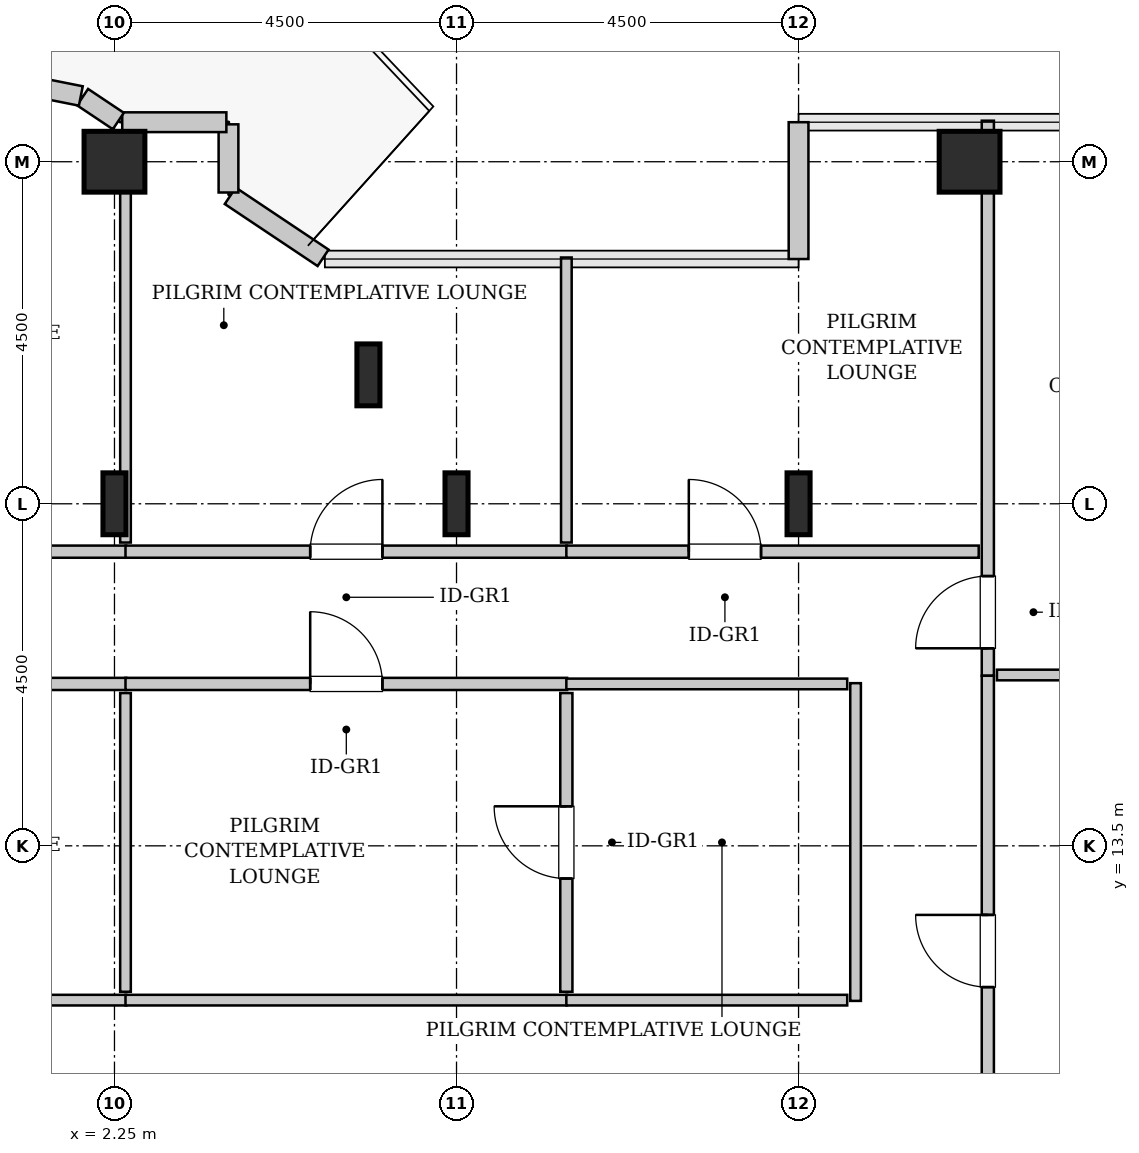
"""IFC4 building model, lengths in metres.
Left out: names, types, materials, properties, quantities, classifications, styles, units other than length and angle.
Written with IfcOpenShell. Run it as: python <this file> out.ifc"""

import sys

from ifc_helpers import new_model, si_unit, direction, frame, frame_2d, origin, origin_2d, place, context, subcontext, project, spatial, rectangle, hollow_rectangle, i_section, extrude, source, transform, mapped, element, fill, save


model = new_model("IFC4")
c1 = context("Model", 3, precision=1e-05, world=origin(), true_north=direction((0.0, 1.0)))
c2 = subcontext(c1, "Body", "Model", "MODEL_VIEW")
j1 = project(units=[si_unit("LENGTHUNIT", "METRE"), si_unit("PLANEANGLEUNIT", "RADIAN")], contexts=[c1])
p1 = place(None, origin())
s1 = spatial("IfcSite", under=j1, at=p1, CompositionType="ELEMENT")
p2 = place(p1, origin())
s2 = spatial("IfcBuilding", under=s1, at=p2, CompositionType="ELEMENT")
p3 = place(p2, frame((0.0, 0.0, 148.8)))
s3 = spatial("IfcBuildingStorey", under=s2, at=p3, CompositionType="ELEMENT", Elevation=148.8)
m1 = source(origin(), c2, "Body", "SweptSolid", [
    extrude(i_section(OverallWidth=0.303, OverallDepth=0.814, WebThickness=0.021, FlangeThickness=0.04, FilletRadius=0.03, at=origin_2d()), origin(), (0.0, 0.0, 1.0), 3.8),
])
p4 = place(p3, frame((2.25, 18.0, 0.0), z_axis=(0.0, 0.0, 1.0), x_axis=(1.0, 0.0, 0.0)))
e1 = element("IfcColumn", 1, at=p4, inside=s3, PredefinedType="COLUMN", context=c2, shape_type="MappedRepresentation", body=[
    mapped(m1, transform((0.0, 0.0, 0.0), x_axis=(1.0, 0.0, 0.0), y_axis=(0.0, 1.0, 0.0), z_axis=(0.0, 0.0, 1.0), scale=1.0)),
])
m2 = source(origin(), c2, "Body", "SweptSolid", [
    extrude(hollow_rectangle(XDim=0.8, YDim=0.8, WallThickness=0.04, InnerFilletRadius=0.04, OuterFilletRadius=0.08, at=origin_2d()), origin(), (0.0, 0.0, 1.0), 3.8),
])
p5 = place(p3, frame((2.25, 22.5, 0.0), z_axis=(0.0, 0.0, 1.0), x_axis=(1.0, 0.0, 0.0)))
e2 = element("IfcColumn", 2, at=p5, inside=s3, PredefinedType="COLUMN", context=c2, shape_type="MappedRepresentation", body=[
    mapped(m2, transform((0.0, 0.0, 0.0), x_axis=(1.0, 0.0, 0.0), y_axis=(0.0, 1.0, 0.0), z_axis=(0.0, 0.0, 1.0), scale=1.0)),
])
for number, where, z_axis, x_axis in (
    (3, (5.591, 19.696, 0.0), (0.0, 0.0, 1.0), (1.0, 0.0, 0.0)),
    (4, (6.75, 18.0, 0.0), (0.0, 0.0, 1.0), (1.0, 0.0, 0.0)),
    (5, (11.25, 18.0, 0.0), (0.0, 0.0, 1.0), (1.0, 0.0, 0.0)),
):
    element("IfcColumn", number, at=place(p3, frame(where, z_axis=z_axis, x_axis=x_axis)), inside=s3, PredefinedType="COLUMN", context=c2, shape_type="MappedRepresentation", body=[
        mapped(m1, transform((0.0, 0.0, 0.0), x_axis=(1.0, 0.0, 0.0), y_axis=(0.0, 1.0, 0.0), z_axis=(0.0, 0.0, 1.0), scale=1.0)),
    ])
p6 = place(p3, frame((13.5, 22.5, 0.0), z_axis=(0.0, 0.0, 1.0), x_axis=(1.0, 0.0, 0.0)))
e6 = element("IfcColumn", 6, at=p6, inside=s3, PredefinedType="COLUMN", context=c2, shape_type="MappedRepresentation", body=[
    mapped(m2, transform((0.0, 0.0, 0.0), x_axis=(1.0, 0.0, 0.0), y_axis=(0.0, 1.0, 0.0), z_axis=(0.0, 0.0, 1.0), scale=1.0)),
])
m3 = source(origin(), c2, "Body", "SweptSolid", [
    extrude(rectangle(XDim=1.8, YDim=0.26, at=frame_2d((0.9, 0.0))), origin(), (0.0, 0.0, 1.0), 3.55),
])
p7 = place(p3, frame((11.25, 23.02, 0.0), z_axis=(0.0, 0.0, 1.0), x_axis=(0.0, -1.0, 0.0)))
e7 = element("IfcWall", 7, at=p7, inside=s3, PredefinedType="SOLIDWALL", context=c2, shape_type="MappedRepresentation", body=[
    mapped(m3, transform((0.0, 0.0, 0.0), x_axis=(1.0, 0.0, 0.0), y_axis=(0.0, 1.0, 0.0), z_axis=(0.0, 0.0, 1.0), scale=1.0)),
])
m4 = source(origin(), c2, "Body", "SweptSolid", [
    extrude(rectangle(XDim=1.469, YDim=0.26, at=frame_2d((0.734, 0.0))), origin(), (0.0, 0.0, 1.0), 3.55),
])
p8 = place(p3, frame((4.995, 21.236, 0.0), z_axis=(0.0, 0.0, 1.0), x_axis=(-0.831461760506, 0.555581983884, 0.0)))
e8 = element("IfcWall", 8, at=p8, inside=s3, PredefinedType="SOLIDWALL", context=c2, shape_type="MappedRepresentation", body=[
    mapped(m4, transform((0.0, 0.0, 0.0), x_axis=(1.0, 0.0, 0.0), y_axis=(0.0, 1.0, 0.0), z_axis=(0.0, 0.0, 1.0), scale=1.0)),
])
m5 = source(origin(), c2, "Body", "SweptSolid", [
    extrude(rectangle(XDim=0.897, YDim=0.26, at=frame_2d((0.448, 0.0))), origin(), (0.0, 0.0, 1.0), 3.55),
])
p9 = place(p3, frame((3.75, 22.095, 0.0), z_axis=(0.0, 0.0, 1.0), x_axis=(0.0, 1.0, 0.0)))
e9 = element("IfcWall", 9, at=p9, inside=s3, PredefinedType="SOLIDWALL", context=c2, shape_type="MappedRepresentation", body=[
    mapped(m5, transform((0.0, 0.0, 0.0), x_axis=(1.0, 0.0, 0.0), y_axis=(0.0, 1.0, 0.0), z_axis=(0.0, 0.0, 1.0), scale=1.0)),
])
m6 = source(origin(), c2, "Body", "SweptSolid", [
    extrude(rectangle(XDim=1.37, YDim=0.26, at=frame_2d((0.685, 0.0))), origin(), (0.0, 0.0, 1.0), 3.55),
])
p10 = place(p3, frame((3.722, 23.02, 0.0), z_axis=(0.0, 0.0, 1.0), x_axis=(-1.0, 0.0, 0.0)))
e10 = element("IfcWall", 10, at=p10, inside=s3, PredefinedType="SOLIDWALL", context=c2, shape_type="MappedRepresentation", body=[
    mapped(m6, transform((0.0, 0.0, 0.0), x_axis=(1.0, 0.0, 0.0), y_axis=(0.0, 1.0, 0.0), z_axis=(0.0, 0.0, 1.0), scale=1.0)),
])
m7 = source(origin(), c2, "Body", "SweptSolid", [
    extrude(rectangle(XDim=0.565, YDim=0.26, at=frame_2d((0.283, 0.0))), origin(), (0.0, 0.0, 1.0), 3.55),
])
p11 = place(p3, frame((2.301, 23.036, 0.0), z_axis=(0.0, 0.0, 1.0), x_axis=(-0.831651492666, 0.555297933317, 0.0)))
e11 = element("IfcWall", 11, at=p11, inside=s3, PredefinedType="SOLIDWALL", context=c2, shape_type="MappedRepresentation", body=[
    mapped(m7, transform((0.0, 0.0, 0.0), x_axis=(1.0, 0.0, 0.0), y_axis=(0.0, 1.0, 0.0), z_axis=(0.0, 0.0, 1.0), scale=1.0)),
])
m8 = source(origin(), c2, "Body", "SweptSolid", [
    extrude(rectangle(XDim=4.137, YDim=0.26, at=frame_2d((2.068, 0.0))), origin(), (0.0, 0.0, 1.0), 3.55),
])
p12 = place(p3, frame((1.807, 23.365, 0.0), z_axis=(0.0, 0.0, 1.0), x_axis=(-0.980782170794, 0.195105954428, 0.0)))
e12 = element("IfcWall", 12, at=p12, inside=s3, PredefinedType="SOLIDWALL", context=c2, shape_type="MappedRepresentation", body=[
    mapped(m8, transform((0.0, 0.0, 0.0), x_axis=(1.0, 0.0, 0.0), y_axis=(0.0, 1.0, 0.0), z_axis=(0.0, 0.0, 1.0), scale=1.0)),
])
p13 = place(p12, frame((0.488, 0.0, 0.0)))
e13 = element("IfcOpeningElement", 13, at=p13, cuts=e12, PredefinedType="OPENING", context=c2, shape_type="SweptSolid", body=[
    extrude(rectangle(XDim=1.1, YDim=2.2, at=frame_2d((0.55, 1.1))), frame((0.0, 0.14, 0.0), z_axis=(0.0, -1.0, 0.0), x_axis=(1.0, 0.0, 0.0)), (0.0, 0.0, 1.0), 0.28),
])
m9 = source(origin(), c2, "Body", "SweptSolid", [
    extrude(rectangle(XDim=7.302, YDim=0.16, at=frame_2d((3.651, 0.0))), origin(), (0.0, 0.0, 1.0), 3.535),
])
p14 = place(p3, frame((13.74, 15.738, 0.0), z_axis=(0.0, 0.0, 1.0), x_axis=(0.0, 1.0, 0.0)))
e14 = element("IfcWall", 14, at=p14, inside=s3, PredefinedType="PARTITIONING", context=c2, shape_type="MappedRepresentation", body=[
    mapped(m9, transform((0.0, 0.0, 0.0), x_axis=(1.0, 0.0, 0.0), y_axis=(0.0, 1.0, 0.0), z_axis=(0.0, 0.0, 1.0), scale=1.0)),
])
p15 = place(p14, frame((0.361, 0.0, 0.0)))
e15 = element("IfcOpeningElement", 15, at=p15, cuts=e14, PredefinedType="OPENING", context=c2, shape_type="SweptSolid", body=[
    extrude(rectangle(XDim=0.95, YDim=2.1, at=frame_2d((0.475, 1.05))), frame((0.0, 0.09, 0.0), z_axis=(0.0, -1.0, 0.0), x_axis=(1.0, 0.0, 0.0)), (0.0, 0.0, 1.0), 0.18),
])
m10 = source(origin(), c2, "Body", "SweptSolid", [
    extrude(rectangle(XDim=11.43, YDim=0.14, at=frame_2d((5.715, 0.0))), origin(), (0.0, 0.0, 1.0), 3.535),
])
p16 = place(p3, frame((13.86, 15.748, 0.0), z_axis=(0.0, 0.0, 1.0), x_axis=(1.0, 0.0, 0.0)))
e16 = element("IfcWall", 16, at=p16, inside=s3, PredefinedType="PARTITIONING", context=c2, shape_type="MappedRepresentation", body=[
    mapped(m10, transform((0.0, 0.0, 0.0), x_axis=(1.0, 0.0, 0.0), y_axis=(0.0, 1.0, 0.0), z_axis=(0.0, 0.0, 1.0), scale=1.0)),
])
m11 = source(origin(), c2, "Body", "SweptSolid", [
    extrude(rectangle(XDim=7.242, YDim=0.16, at=frame_2d((3.621, 0.0))), origin(), (0.0, 0.0, 1.0), 3.535),
])
p17 = place(p3, frame((13.74, 8.495, 0.0), z_axis=(0.0, 0.0, 1.0), x_axis=(0.0, 1.0, 0.0)))
e17 = element("IfcWall", 17, at=p17, inside=s3, PredefinedType="PARTITIONING", context=c2, shape_type="MappedRepresentation", body=[
    mapped(m11, transform((0.0, 0.0, 0.0), x_axis=(1.0, 0.0, 0.0), y_axis=(0.0, 1.0, 0.0), z_axis=(0.0, 0.0, 1.0), scale=1.0)),
])
p18 = place(p17, frame((3.146, 0.0, 0.0)))
e18 = element("IfcOpeningElement", 18, at=p18, cuts=e17, PredefinedType="OPENING", context=c2, shape_type="SweptSolid", body=[
    extrude(rectangle(XDim=0.95, YDim=2.1, at=frame_2d((0.475, 1.05))), frame((0.0, 0.09, 0.0), z_axis=(0.0, -1.0, 0.0), x_axis=(1.0, 0.0, 0.0)), (0.0, 0.0, 1.0), 0.18),
])
m12 = source(origin(), c2, "Body", "SweptSolid", [
    extrude(rectangle(XDim=7.41, YDim=0.16, at=frame_2d((3.705, 0.0))), origin(), (0.0, 0.0, 1.0), 3.535),
])
p19 = place(p3, frame((-5.005, 17.37, 0.0), z_axis=(0.0, 0.0, 1.0), x_axis=(1.0, 0.0, 0.0)))
e19 = element("IfcWall", 19, at=p19, inside=s3, PredefinedType="PARTITIONING", context=c2, shape_type="MappedRepresentation", body=[
    mapped(m12, transform((0.0, 0.0, 0.0), x_axis=(1.0, 0.0, 0.0), y_axis=(0.0, 1.0, 0.0), z_axis=(0.0, 0.0, 1.0), scale=1.0)),
])
p20 = place(p19, frame((3.23, 0.0, 0.0)))
e20 = element("IfcOpeningElement", 20, at=p20, cuts=e19, PredefinedType="OPENING", context=c2, shape_type="SweptSolid", body=[
    extrude(rectangle(XDim=0.95, YDim=2.1, at=frame_2d((0.475, 1.05))), frame((0.0, 0.09, 0.0), z_axis=(0.0, -1.0, 0.0), x_axis=(1.0, 0.0, 0.0)), (0.0, 0.0, 1.0), 0.18),
])
m13 = source(origin(), c2, "Body", "SweptSolid", [
    extrude(rectangle(XDim=5.36, YDim=0.14, at=frame_2d((2.68, 0.0))), origin(), (0.0, 0.0, 1.0), 2.875),
])
p21 = place(p3, frame((2.395, 17.49, 0.0), z_axis=(0.0, 0.0, 1.0), x_axis=(0.0, 1.0, 0.0)))
e21 = element("IfcWall", 21, at=p21, inside=s3, PredefinedType="PARTITIONING", context=c2, shape_type="MappedRepresentation", body=[
    mapped(m13, transform((0.0, 0.0, 0.0), x_axis=(1.0, 0.0, 0.0), y_axis=(0.0, 1.0, 0.0), z_axis=(0.0, 0.0, 1.0), scale=1.0)),
])
p22 = place(p3, frame((-5.005, 15.63, 0.0), z_axis=(0.0, 0.0, 1.0), x_axis=(1.0, 0.0, 0.0)))
e22 = element("IfcWall", 22, at=p22, inside=s3, PredefinedType="PARTITIONING", context=c2, shape_type="MappedRepresentation", body=[
    mapped(m12, transform((0.0, 0.0, 0.0), x_axis=(1.0, 0.0, 0.0), y_axis=(0.0, 1.0, 0.0), z_axis=(0.0, 0.0, 1.0), scale=1.0)),
])
p23 = place(p22, frame((3.23, 0.0, 0.0)))
e23 = element("IfcOpeningElement", 23, at=p23, cuts=e22, PredefinedType="OPENING", context=c2, shape_type="SweptSolid", body=[
    extrude(rectangle(XDim=0.95, YDim=2.1, at=frame_2d((0.475, 1.05))), frame((0.0, 0.09, 0.0), z_axis=(0.0, -1.0, 0.0), x_axis=(1.0, 0.0, 0.0)), (0.0, 0.0, 1.0), 0.18),
])
m14 = source(origin(), c2, "Body", "SweptSolid", [
    extrude(rectangle(XDim=7.41, YDim=0.14, at=frame_2d((3.705, 0.0))), origin(), (0.0, 0.0, 1.0), 3.535),
])
p24 = place(p3, frame((-5.005, 11.47, 0.0), z_axis=(0.0, 0.0, 1.0), x_axis=(1.0, 0.0, 0.0)))
e24 = element("IfcWall", 24, at=p24, inside=s3, PredefinedType="PARTITIONING", context=c2, shape_type="MappedRepresentation", body=[
    mapped(m14, transform((0.0, 0.0, 0.0), x_axis=(1.0, 0.0, 0.0), y_axis=(0.0, 1.0, 0.0), z_axis=(0.0, 0.0, 1.0), scale=1.0)),
])
m15 = source(origin(), c2, "Body", "SweptSolid", [
    extrude(rectangle(XDim=3.93, YDim=0.14, at=frame_2d((1.965, 0.0))), origin(), (0.0, 0.0, 1.0), 3.535),
])
p25 = place(p3, frame((2.395, 11.58, 0.0), z_axis=(0.0, 0.0, 1.0), x_axis=(0.0, 1.0, 0.0)))
e25 = element("IfcWall", 25, at=p25, inside=s3, PredefinedType="PARTITIONING", context=c2, shape_type="MappedRepresentation", body=[
    mapped(m15, transform((0.0, 0.0, 0.0), x_axis=(1.0, 0.0, 0.0), y_axis=(0.0, 1.0, 0.0), z_axis=(0.0, 0.0, 1.0), scale=1.0)),
])
m16 = source(origin(), c2, "Body", "SweptSolid", [
    extrude(rectangle(XDim=5.81, YDim=0.16, at=frame_2d((2.905, 0.0))), origin(), (0.0, 0.0, 1.0), 3.535),
])
p26 = place(p3, frame((2.395, 17.37, 0.0), z_axis=(0.0, 0.0, 1.0), x_axis=(1.0, 0.0, 0.0)))
e26 = element("IfcWall", 26, at=p26, inside=s3, PredefinedType="PARTITIONING", context=c2, shape_type="MappedRepresentation", body=[
    mapped(m16, transform((0.0, 0.0, 0.0), x_axis=(1.0, 0.0, 0.0), y_axis=(0.0, 1.0, 0.0), z_axis=(0.0, 0.0, 1.0), scale=1.0)),
])
p27 = place(p26, frame((2.43, 0.0, 0.0)))
e27 = element("IfcOpeningElement", 27, at=p27, cuts=e26, PredefinedType="OPENING", context=c2, shape_type="SweptSolid", body=[
    extrude(rectangle(XDim=0.95, YDim=2.1, at=frame_2d((0.475, 1.05))), frame((0.0, 0.09, 0.0), z_axis=(0.0, -1.0, 0.0), x_axis=(1.0, 0.0, 0.0)), (0.0, 0.0, 1.0), 0.18),
])
m17 = source(origin(), c2, "Body", "SweptSolid", [
    extrude(rectangle(XDim=3.75, YDim=0.14, at=frame_2d((1.875, 0.0))), origin(), (0.0, 0.0, 1.0), 3.535),
])
p28 = place(p3, frame((8.195, 17.49, 0.0), z_axis=(0.0, 0.0, 1.0), x_axis=(0.0, 1.0, 0.0)))
e28 = element("IfcWall", 28, at=p28, inside=s3, PredefinedType="PARTITIONING", context=c2, shape_type="MappedRepresentation", body=[
    mapped(m17, transform((0.0, 0.0, 0.0), x_axis=(1.0, 0.0, 0.0), y_axis=(0.0, 1.0, 0.0), z_axis=(0.0, 0.0, 1.0), scale=1.0)),
])
p29 = place(p3, frame((2.395, 15.63, 0.0), z_axis=(0.0, 0.0, 1.0), x_axis=(1.0, 0.0, 0.0)))
e29 = element("IfcWall", 29, at=p29, inside=s3, PredefinedType="PARTITIONING", context=c2, shape_type="MappedRepresentation", body=[
    mapped(m16, transform((0.0, 0.0, 0.0), x_axis=(1.0, 0.0, 0.0), y_axis=(0.0, 1.0, 0.0), z_axis=(0.0, 0.0, 1.0), scale=1.0)),
])
p30 = place(p29, frame((2.43, 0.0, 0.0)))
e30 = element("IfcOpeningElement", 30, at=p30, cuts=e29, PredefinedType="OPENING", context=c2, shape_type="SweptSolid", body=[
    extrude(rectangle(XDim=0.95, YDim=2.1, at=frame_2d((0.475, 1.05))), frame((0.0, 0.09, 0.0), z_axis=(0.0, -1.0, 0.0), x_axis=(1.0, 0.0, 0.0)), (0.0, 0.0, 1.0), 0.18),
])
m18 = source(origin(), c2, "Body", "SweptSolid", [
    extrude(rectangle(XDim=5.81, YDim=0.14, at=frame_2d((2.905, 0.0))), origin(), (0.0, 0.0, 1.0), 3.535),
])
p31 = place(p3, frame((2.395, 11.47, 0.0), z_axis=(0.0, 0.0, 1.0), x_axis=(1.0, 0.0, 0.0)))
e31 = element("IfcWall", 31, at=p31, inside=s3, PredefinedType="PARTITIONING", context=c2, shape_type="MappedRepresentation", body=[
    mapped(m18, transform((0.0, 0.0, 0.0), x_axis=(1.0, 0.0, 0.0), y_axis=(0.0, 1.0, 0.0), z_axis=(0.0, 0.0, 1.0), scale=1.0)),
])
m19 = source(origin(), c2, "Body", "SweptSolid", [
    extrude(rectangle(XDim=3.93, YDim=0.16, at=frame_2d((1.965, 0.0))), origin(), (0.0, 0.0, 1.0), 3.535),
])
p32 = place(p3, frame((8.195, 11.58, 0.0), z_axis=(0.0, 0.0, 1.0), x_axis=(0.0, 1.0, 0.0)))
e32 = element("IfcWall", 32, at=p32, inside=s3, PredefinedType="PARTITIONING", context=c2, shape_type="MappedRepresentation", body=[
    mapped(m19, transform((0.0, 0.0, 0.0), x_axis=(1.0, 0.0, 0.0), y_axis=(0.0, 1.0, 0.0), z_axis=(0.0, 0.0, 1.0), scale=1.0)),
])
p33 = place(p32, frame((1.49, 0.0, 0.0)))
e33 = element("IfcOpeningElement", 33, at=p33, cuts=e32, PredefinedType="OPENING", context=c2, shape_type="SweptSolid", body=[
    extrude(rectangle(XDim=0.95, YDim=2.1, at=frame_2d((0.475, 1.05))), frame((0.0, 0.09, 0.0), z_axis=(0.0, -1.0, 0.0), x_axis=(1.0, 0.0, 0.0)), (0.0, 0.0, 1.0), 0.18),
])
m20 = source(origin(), c2, "Body", "SweptSolid", [
    extrude(rectangle(XDim=5.425, YDim=0.16, at=frame_2d((2.712, 0.0))), origin(), (0.0, 0.0, 1.0), 3.535),
])
p34 = place(p3, frame((8.195, 17.37, 0.0), z_axis=(0.0, 0.0, 1.0), x_axis=(1.0, 0.0, 0.0)))
e34 = element("IfcWall", 34, at=p34, inside=s3, PredefinedType="PARTITIONING", context=c2, shape_type="MappedRepresentation", body=[
    mapped(m20, transform((0.0, 0.0, 0.0), x_axis=(1.0, 0.0, 0.0), y_axis=(0.0, 1.0, 0.0), z_axis=(0.0, 0.0, 1.0), scale=1.0)),
])
p35 = place(p34, frame((1.611, 0.0, 0.0)))
e35 = element("IfcOpeningElement", 35, at=p35, cuts=e34, PredefinedType="OPENING", context=c2, shape_type="SweptSolid", body=[
    extrude(rectangle(XDim=0.95, YDim=2.1, at=frame_2d((0.475, 1.05))), frame((0.0, 0.09, 0.0), z_axis=(0.0, -1.0, 0.0), x_axis=(1.0, 0.0, 0.0)), (0.0, 0.0, 1.0), 0.18),
])
m21 = source(origin(), c2, "Body", "SweptSolid", [
    extrude(rectangle(XDim=4.18, YDim=0.14, at=frame_2d((2.09, 0.0))), origin(), (0.0, 0.0, 1.0), 3.535),
])
p36 = place(p3, frame((12.0, 11.46, 0.0), z_axis=(0.0, 0.0, 1.0), x_axis=(0.0, 1.0, 0.0)))
e36 = element("IfcWall", 36, at=p36, inside=s3, PredefinedType="PARTITIONING", context=c2, shape_type="MappedRepresentation", body=[
    mapped(m21, transform((0.0, 0.0, 0.0), x_axis=(1.0, 0.0, 0.0), y_axis=(0.0, 1.0, 0.0), z_axis=(0.0, 0.0, 1.0), scale=1.0)),
])
m22 = source(origin(), c2, "Body", "SweptSolid", [
    extrude(rectangle(XDim=3.695, YDim=0.14, at=frame_2d((1.847, 0.0))), origin(), (0.0, 0.0, 1.0), 3.535),
])
for number, where, z_axis, x_axis in (
    (37, (8.195, 15.63, 0.0), (0.0, 0.0, 1.0), (1.0, 0.0, 0.0)),
    (38, (8.195, 11.47, 0.0), (0.0, 0.0, 1.0), (1.0, 0.0, 0.0)),
):
    element("IfcWall", number, at=place(p3, frame(where, z_axis=z_axis, x_axis=x_axis)), inside=s3, PredefinedType="PARTITIONING", context=c2, shape_type="MappedRepresentation", body=[
        mapped(m22, transform((0.0, 0.0, 0.0), x_axis=(1.0, 0.0, 0.0), y_axis=(0.0, 1.0, 0.0), z_axis=(0.0, 0.0, 1.0), scale=1.0)),
    ])
m23 = source(origin(), c2, "Body", "SweptSolid", [
    extrude(rectangle(XDim=0.95, YDim=2.1, at=frame_2d((0.475, 1.05))), frame((0.0, 0.025, 0.0), z_axis=(0.0, -1.0, 0.0), x_axis=(1.0, 0.0, 0.0)), (0.0, 0.0, 1.0), 0.05),
])
p37 = place(p15, origin())
e39 = element("IfcDoor", 39, at=p37, inside=s3, OperationType="SINGLE_SWING_LEFT", PredefinedType="DOOR", context=c2, shape_type="MappedRepresentation", body=[
    mapped(m23, transform((0.0, 0.0, 0.0), x_axis=(1.0, 0.0, 0.0), y_axis=(0.0, 1.0, 0.0), z_axis=(0.0, 0.0, 1.0), scale=1.0)),
])
fill(e15, e39)
p38 = place(p18, origin())
e40 = element("IfcDoor", 40, at=p38, inside=s3, OperationType="SINGLE_SWING_RIGHT", PredefinedType="DOOR", context=c2, shape_type="MappedRepresentation", body=[
    mapped(m23, transform((0.0, 0.0, 0.0), x_axis=(1.0, 0.0, 0.0), y_axis=(0.0, 1.0, 0.0), z_axis=(0.0, 0.0, 1.0), scale=1.0)),
])
fill(e18, e40)
p39 = place(p27, origin())
e41 = element("IfcDoor", 41, at=p39, inside=s3, OperationType="SINGLE_SWING_RIGHT", PredefinedType="DOOR", context=c2, shape_type="MappedRepresentation", body=[
    mapped(m23, transform((0.0, 0.0, 0.0), x_axis=(1.0, 0.0, 0.0), y_axis=(0.0, 1.0, 0.0), z_axis=(0.0, 0.0, 1.0), scale=1.0)),
])
fill(e27, e41)
p40 = place(p30, origin())
e42 = element("IfcDoor", 42, at=p40, inside=s3, OperationType="SINGLE_SWING_LEFT", PredefinedType="DOOR", context=c2, shape_type="MappedRepresentation", body=[
    mapped(m23, transform((0.0, 0.0, 0.0), x_axis=(1.0, 0.0, 0.0), y_axis=(0.0, 1.0, 0.0), z_axis=(0.0, 0.0, 1.0), scale=1.0)),
])
fill(e30, e42)
p41 = place(p33, origin())
e43 = element("IfcDoor", 43, at=p41, inside=s3, OperationType="SINGLE_SWING_RIGHT", PredefinedType="DOOR", context=c2, shape_type="MappedRepresentation", body=[
    mapped(m23, transform((0.0, 0.0, 0.0), x_axis=(1.0, 0.0, 0.0), y_axis=(0.0, 1.0, 0.0), z_axis=(0.0, 0.0, 1.0), scale=1.0)),
])
fill(e33, e43)
p42 = place(p35, origin())
e44 = element("IfcDoor", 44, at=p42, inside=s3, OperationType="SINGLE_SWING_LEFT", PredefinedType="DOOR", context=c2, shape_type="MappedRepresentation", body=[
    mapped(m23, transform((0.0, 0.0, 0.0), x_axis=(1.0, 0.0, 0.0), y_axis=(0.0, 1.0, 0.0), z_axis=(0.0, 0.0, 1.0), scale=1.0)),
])
fill(e35, e44)
save(model, sys.argv[1])
